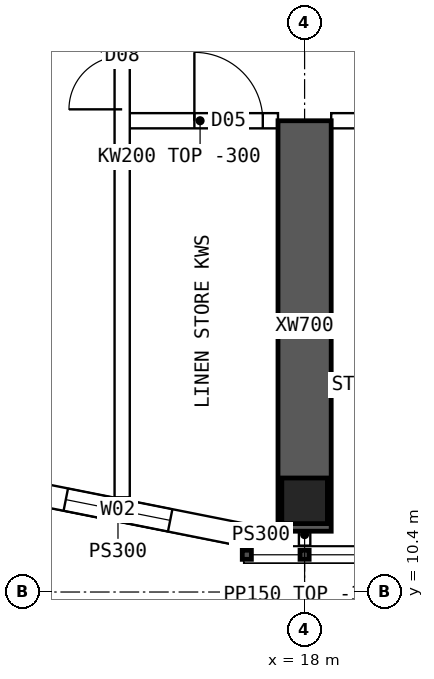
"""IFC4 building model, lengths in metres.
Left out: names, types, materials, properties, quantities, classifications, styles, units other than length and angle.
Written with IfcOpenShell. Run it as: python <this file> out.ifc"""

import sys

from ifc_helpers import new_model, si_unit, direction, frame, frame_2d, origin, origin_2d, place, context, subcontext, project, spatial, polyline, rectangle, hollow_rectangle, outline, extrude, element, fill, save


model = new_model("IFC4")
c1 = context("Model", 3, precision=1e-05, world=origin(), true_north=direction((0.0, 1.0)))
c2 = subcontext(c1, "Body", "Model", "MODEL_VIEW")
j1 = project(units=[si_unit("LENGTHUNIT", "METRE"), si_unit("PLANEANGLEUNIT", "RADIAN")], contexts=[c1])
p1 = place(None, origin())
s1 = spatial("IfcSite", under=j1, at=p1, CompositionType="ELEMENT")
p2 = place(p1, origin())
s2 = spatial("IfcBuilding", under=s1, at=p2, CompositionType="ELEMENT")
p3 = place(p2, frame((0.0, 0.0, 254.05)))
s3 = spatial("IfcBuildingStorey", under=s2, at=p3, CompositionType="ELEMENT", Elevation=254.05)
p4 = place(p3, frame((18.0, 11.6, 0.0), z_axis=(0.0, 0.0, 1.0), x_axis=(1.0, 0.0, 0.0)))
e1 = element("IfcColumn", 1, at=p4, inside=s3, PredefinedType="COLUMN", context=c2, shape_type="SweptSolid", body=[
    extrude(hollow_rectangle(XDim=0.6, YDim=0.6, WallThickness=0.06, at=origin_2d()), origin(), (0.0, 0.0, 1.0), 3.75),
])
p5 = place(p3, frame((18.0, 11.2, 0.0), z_axis=(0.0, 0.0, 1.0), x_axis=(0.0, 1.0, 0.0)))
e2 = element("IfcWall", 2, at=p5, inside=s3, PredefinedType="SHEAR", context=c2, shape_type="SweptSolid", body=[
    extrude(rectangle(XDim=5.4, YDim=0.7, at=frame_2d((2.7, 0.0))), origin(), (0.0, 0.0, 1.0), 3.75),
])
p6 = place(p3, frame((13.89, 11.808, 0.0), z_axis=(0.0, 0.0, 1.0), x_axis=(0.98078325777, -0.195100490205, 0.0)))
e3 = element("IfcWall", 3, at=p6, inside=s3, PredefinedType="SOLIDWALL", context=c2, shape_type="SweptSolid", body=[
    extrude(outline(polyline([(-0.03, -0.15), (3.405, -0.15), (3.345, 0.15), (0.03, 0.15), (-0.03, -0.15)])), origin(), (0.0, 0.0, 1.0), 3.45),
])
p7 = place(p6, frame((0.988, 0.0, 0.9)))
e4 = element("IfcOpeningElement", 4, at=p7, cuts=e3, PredefinedType="OPENING", context=c2, shape_type="SweptSolid", body=[
    extrude(rectangle(XDim=1.4, YDim=1.8, at=frame_2d((0.7, 0.9))), frame((0.0, 0.16, 0.0), z_axis=(0.0, -1.0, 0.0), x_axis=(1.0, 0.0, 0.0)), (0.0, 0.0, 1.0), 0.32),
])
p8 = place(p3, frame((17.2, 11.15, 0.0), z_axis=(0.0, 0.0, 1.0), x_axis=(1.0, 0.0, 0.0)))
e5 = element("IfcWall", 5, at=p8, inside=s3, PredefinedType="SOLIDWALL", context=c2, shape_type="SweptSolid", body=[
    extrude(rectangle(XDim=0.45, YDim=0.3, at=frame_2d((0.225, 0.0))), origin(), (0.0, 0.0, 1.0), 3.45),
])
p9 = place(p3, frame((15.6, 16.6, 0.0), z_axis=(0.0, 0.0, 1.0), x_axis=(1.0, 0.0, 0.0)))
e6 = element("IfcWall", 6, at=p9, inside=s3, PredefinedType="SOLIDWALL", context=c2, shape_type="SweptSolid", body=[
    extrude(rectangle(XDim=2.05, YDim=0.2, at=frame_2d((1.025, 0.0))), origin(), (0.0, 0.0, 1.0), 3.45),
])
p10 = place(p9, frame((0.95, 0.0, 0.0)))
e7 = element("IfcOpeningElement", 7, at=p10, cuts=e6, PredefinedType="OPENING", context=c2, shape_type="SweptSolid", body=[
    extrude(rectangle(XDim=0.9, YDim=2.1, at=frame_2d((0.45, 1.05))), frame((0.0, 0.11, 0.0), z_axis=(0.0, -1.0, 0.0), x_axis=(1.0, 0.0, 0.0)), (0.0, 0.0, 1.0), 0.22),
])
p11 = place(p3, frame((18.35, 16.6, 0.0), z_axis=(0.0, 0.0, 1.0), x_axis=(1.0, 0.0, 0.0)))
e8 = element("IfcWall", 8, at=p11, inside=s3, PredefinedType="SOLIDWALL", context=c2, shape_type="SweptSolid", body=[
    extrude(outline(polyline([(0.0, 0.0), (5.3, 0.0), (5.3, 3.05), (0.0, 3.05), (0.0, 0.0)])), frame((0.0, 0.1, 0.0), z_axis=(0.0, -1.0, 0.0), x_axis=(1.0, 0.0, 0.0)), (0.0, 0.0, 1.0), 0.2),
])
p12 = place(p11, frame((2.3, 0.0, 0.0)))
e9 = element("IfcOpeningElement", 9, at=p12, cuts=e8, PredefinedType="OPENING", context=c2, shape_type="SweptSolid", body=[
    extrude(rectangle(XDim=0.9, YDim=2.1, at=frame_2d((0.45, 1.05))), frame((0.0, 0.11, 0.0), z_axis=(0.0, -1.0, 0.0), x_axis=(1.0, 0.0, 0.0)), (0.0, 0.0, 1.0), 0.22),
])
p13 = place(p3, frame((15.6, 11.646, 0.0), z_axis=(0.0, 0.0, 1.0), x_axis=(0.0, 1.0, 0.0)))
e10 = element("IfcWall", 10, at=p13, inside=s3, PredefinedType="SOLIDWALL", context=c2, shape_type="SweptSolid", body=[
    extrude(rectangle(XDim=40.708, YDim=0.2, at=frame_2d((20.354, 0.0))), origin(), (0.0, 0.0, 1.0), 3.45),
])
p14 = place(p13, frame((21.194, 0.0, 0.0)))
e11 = element("IfcOpeningElement", 11, at=p14, cuts=e10, PredefinedType="OPENING", context=c2, shape_type="SweptSolid", body=[
    extrude(rectangle(XDim=1.2, YDim=2.1, at=frame_2d((0.6, 1.05))), frame((0.0, 0.11, 0.0), z_axis=(0.0, -1.0, 0.0), x_axis=(1.0, 0.0, 0.0)), (0.0, 0.0, 1.0), 0.22),
])
p15 = place(p13, frame((5.104, 0.0, 0.0)))
e12 = element("IfcOpeningElement", 12, at=p15, cuts=e10, PredefinedType="OPENING", context=c2, shape_type="SweptSolid", body=[
    extrude(rectangle(XDim=1.4, YDim=2.1, at=frame_2d((0.7, 1.05))), frame((0.0, 0.11, 0.0), z_axis=(0.0, -1.0, 0.0), x_axis=(1.0, 0.0, 0.0)), (0.0, 0.0, 1.0), 0.22),
])
p16 = place(p13, frame((34.104, 0.0, 0.0)))
e13 = element("IfcOpeningElement", 13, at=p16, cuts=e10, PredefinedType="OPENING", context=c2, shape_type="SweptSolid", body=[
    extrude(rectangle(XDim=1.4, YDim=2.1, at=frame_2d((0.7, 1.05))), frame((0.0, 0.11, 0.0), z_axis=(0.0, -1.0, 0.0), x_axis=(1.0, 0.0, 0.0)), (0.0, 0.0, 1.0), 0.22),
])
p17 = place(p3, frame((18.0, 11.3, 0.0), z_axis=(0.0, 0.0, 1.0), x_axis=(0.0, -1.0, 0.0)))
e14 = element("IfcWall", 14, at=p17, inside=s3, PredefinedType="PARTITIONING", context=c2, shape_type="SweptSolid", body=[
    extrude(rectangle(XDim=0.29, YDim=0.15, at=frame_2d((0.145, 0.0))), origin(), (0.0, 0.0, 1.0), 3.45),
])
p18 = place(p7, origin())
e15 = element("IfcWindow", 15, at=p18, inside=s3, PartitioningType="SINGLE_PANEL", PredefinedType="WINDOW", context=c2, shape_type="SweptSolid", body=[
    extrude(rectangle(XDim=1.4, YDim=1.8, at=frame_2d((0.7, 0.9))), frame((0.0, 0.03, 0.0), z_axis=(0.0, -1.0, 0.0), x_axis=(1.0, 0.0, 0.0)), (0.0, 0.0, 1.0), 0.06),
])
fill(e4, e15)
p19 = place(p15, origin())
e16 = element("IfcDoor", 16, at=p19, inside=s3, OperationType="DOUBLE_DOOR_SINGLE_SWING", PredefinedType="DOOR", context=c2, shape_type="SweptSolid", body=[
    extrude(rectangle(XDim=1.4, YDim=2.1, at=frame_2d((0.7, 1.05))), frame((0.0, 0.025, 0.0), z_axis=(0.0, -1.0, 0.0), x_axis=(1.0, 0.0, 0.0)), (0.0, 0.0, 1.0), 0.05),
])
fill(e12, e16)
p20 = place(p10, origin())
e17 = element("IfcDoor", 17, at=p20, inside=s3, OperationType="SINGLE_SWING_LEFT", PredefinedType="DOOR", context=c2, shape_type="SweptSolid", body=[
    extrude(rectangle(XDim=0.9, YDim=2.1, at=frame_2d((0.45, 1.05))), frame((0.0, 0.025, 0.0), z_axis=(0.0, -1.0, 0.0), x_axis=(1.0, 0.0, 0.0)), (0.0, 0.0, 1.0), 0.05),
])
fill(e7, e17)
save(model, sys.argv[1])
